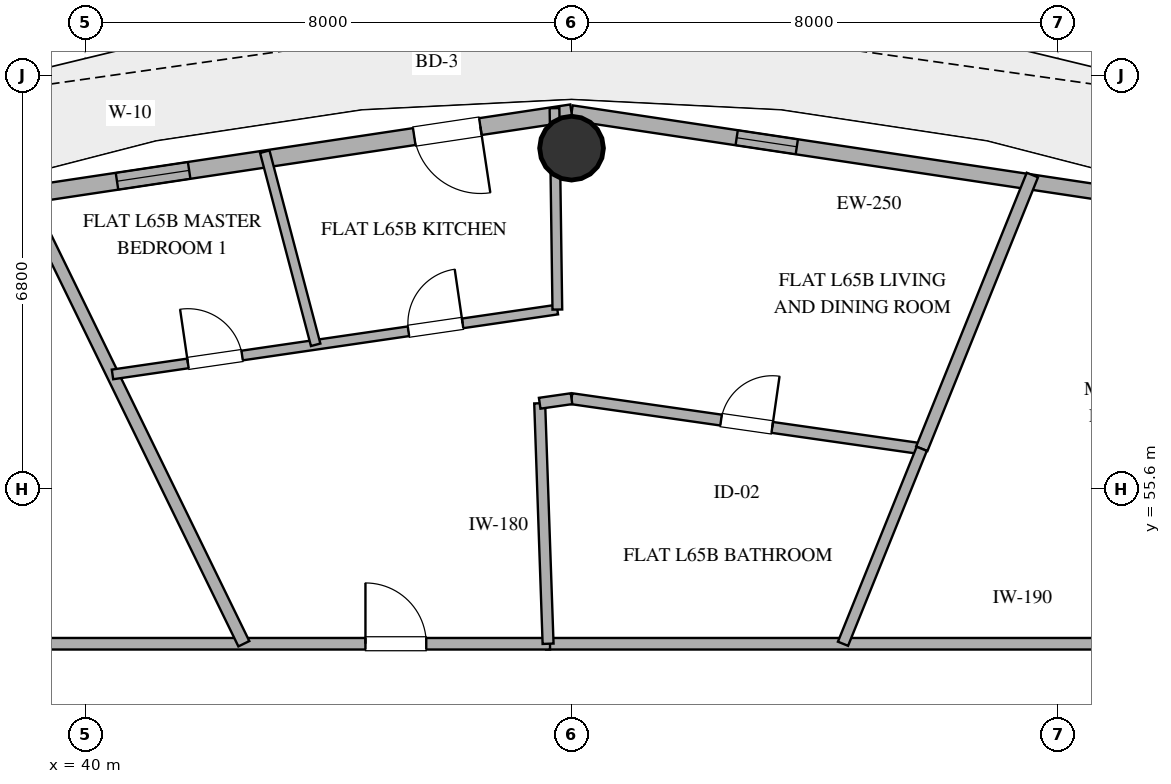
"""IFC4 building model, lengths in metres.
Left out: names, types, materials, properties, quantities, classifications, styles, units other than length and angle.
Written with IfcOpenShell. Run it as: python <this file> out.ifc"""

import sys

from ifc_helpers import new_model, si_unit, direction, frame, frame_2d, origin, origin_2d, place, context, subcontext, project, spatial, rectangle, hollow_circle, extrude, element, fill, save


model = new_model("IFC4")
c1 = context("Model", 3, precision=1e-05, world=origin(), true_north=direction((0.0, 1.0)))
c2 = subcontext(c1, "Body", "Model", "MODEL_VIEW")
j1 = project(units=[si_unit("LENGTHUNIT", "METRE"), si_unit("PLANEANGLEUNIT", "RADIAN")], contexts=[c1])
p1 = place(None, origin())
s1 = spatial("IfcSite", under=j1, at=p1, CompositionType="ELEMENT")
p2 = place(p1, origin())
s2 = spatial("IfcBuilding", under=s1, at=p2, CompositionType="ELEMENT")
p3 = place(p2, frame((0.0, 0.0, 253.2)))
s3 = spatial("IfcBuildingStorey", under=s2, at=p3, CompositionType="ELEMENT", Elevation=253.2)
p4 = place(p3, frame((48.0, 61.2, 0.0), z_axis=(0.0, 0.0, 1.0), x_axis=(1.0, 0.0, 0.0)))
e1 = element("IfcColumn", 1, at=p4, inside=s3, PredefinedType="COLUMN", context=c2, shape_type="SweptSolid", body=[
    extrude(hollow_circle(Radius=0.525, WallThickness=0.028, at=origin_2d()), origin(), (0.0, 0.0, 1.0), 3.25),
])
p5 = place(p3, frame((58.013, 60.274, 0.0), z_axis=(0.0, 0.0, 1.0), x_axis=(-0.988882522213, 0.148698881169, 0.0)))
e2 = element("IfcWall", 2, at=p5, inside=s3, PredefinedType="SOLIDWALL", context=c2, shape_type="SweptSolid", body=[
    extrude(rectangle(XDim=10.125, YDim=0.25, at=frame_2d((5.062, 0.0))), origin(), (0.0, 0.0, 1.0), 3.25),
])
p6 = place(p5, frame((6.379, 0.0, 1.42)))
e3 = element("IfcOpeningElement", 3, at=p6, cuts=e2, PredefinedType="OPENING", context=c2, shape_type="SweptSolid", body=[
    extrude(rectangle(XDim=1.0, YDim=1.05, at=frame_2d((0.5, 0.525))), frame((0.0, 0.135, 0.0), z_axis=(0.0, -1.0, 0.0), x_axis=(1.0, 0.0, 0.0)), (0.0, 0.0, 1.0), 0.27),
])
p7 = place(p3, frame((48.0, 61.78, 0.0), z_axis=(0.0, 0.0, 1.0), x_axis=(-0.988882522213, -0.148698881169, 0.0)))
e4 = element("IfcWall", 4, at=p7, inside=s3, PredefinedType="SOLIDWALL", context=c2, shape_type="SweptSolid", body=[
    extrude(rectangle(XDim=10.125, YDim=0.28, at=frame_2d((5.062, 0.0))), origin(), (0.0, 0.0, 1.0), 3.25),
])
p8 = place(p7, frame((1.516, 0.0, 0.0)))
e5 = element("IfcOpeningElement", 5, at=p8, cuts=e4, PredefinedType="OPENING", context=c2, shape_type="SweptSolid", body=[
    extrude(rectangle(XDim=1.1, YDim=2.25, at=frame_2d((0.55, 1.125))), frame((0.0, 0.15, 0.0), z_axis=(0.0, -1.0, 0.0), x_axis=(1.0, 0.0, 0.0)), (0.0, 0.0, 1.0), 0.3),
])
p9 = place(p7, frame((6.36, 0.0, 0.85)))
e6 = element("IfcOpeningElement", 6, at=p9, cuts=e4, PredefinedType="OPENING", context=c2, shape_type="SweptSolid", body=[
    extrude(rectangle(XDim=1.2, YDim=1.6, at=frame_2d((0.6, 0.8))), frame((0.0, 0.15, 0.0), z_axis=(0.0, -1.0, 0.0), x_axis=(1.0, 0.0, 0.0)), (0.0, 0.0, 1.0), 0.3),
])
p10 = place(p3, frame((47.582, 53.05, 0.0), z_axis=(0.0, 0.0, 1.0), x_axis=(1.0, 0.0, 0.0)))
e7 = element("IfcWall", 7, at=p10, inside=s3, PredefinedType="PARTITIONING", context=c2, shape_type="SweptSolid", body=[
    extrude(rectangle(XDim=15.668, YDim=0.19, at=frame_2d((7.834, 0.0))), origin(), (0.0, 0.0, 1.0), 2.61),
])
p11 = place(p10, frame((9.758, 0.0, 0.0)))
e8 = element("IfcOpeningElement", 8, at=p11, cuts=e7, PredefinedType="OPENING", context=c2, shape_type="SweptSolid", body=[
    extrude(rectangle(XDim=1.0, YDim=2.2, at=frame_2d((0.5, 1.1))), frame((0.0, 0.105, 0.0), z_axis=(0.0, -1.0, 0.0), x_axis=(1.0, 0.0, 0.0)), (0.0, 0.0, 1.0), 0.21),
])
p12 = place(p3, frame((32.75, 53.05, 0.0), z_axis=(0.0, 0.0, 1.0), x_axis=(1.0, 0.0, 0.0)))
e9 = element("IfcWall", 9, at=p12, inside=s3, PredefinedType="PARTITIONING", context=c2, shape_type="SweptSolid", body=[
    extrude(rectangle(XDim=14.896, YDim=0.19, at=frame_2d((7.448, 0.0))), origin(), (0.0, 0.0, 1.0), 2.61),
])
p13 = place(p12, frame((4.448, 0.0, 0.0)))
e10 = element("IfcOpeningElement", 10, at=p13, cuts=e9, PredefinedType="OPENING", context=c2, shape_type="SweptSolid", body=[
    extrude(rectangle(XDim=1.0, YDim=2.2, at=frame_2d((0.5, 1.1))), frame((0.0, 0.105, 0.0), z_axis=(0.0, -1.0, 0.0), x_axis=(1.0, 0.0, 0.0)), (0.0, 0.0, 1.0), 0.21),
])
p14 = place(p12, frame((11.861, 0.0, 0.0)))
e11 = element("IfcOpeningElement", 11, at=p14, cuts=e9, PredefinedType="OPENING", context=c2, shape_type="SweptSolid", body=[
    extrude(rectangle(XDim=1.0, YDim=2.2, at=frame_2d((0.5, 1.1))), frame((0.0, 0.105, 0.0), z_axis=(0.0, -1.0, 0.0), x_axis=(1.0, 0.0, 0.0)), (0.0, 0.0, 1.0), 0.21),
])
p15 = place(p3, frame((48.0, 57.08, 0.0), z_axis=(0.0, 0.0, 1.0), x_axis=(0.98992178104, -0.141615209012, 0.0)))
e12 = element("IfcWall", 12, at=p15, inside=s3, PredefinedType="PLUMBINGWALL", context=c2, shape_type="SweptSolid", body=[
    extrude(rectangle(XDim=5.818, YDim=0.18, at=frame_2d((2.909, 0.0))), origin(), (0.0, 0.0, 1.0), 2.61),
])
p16 = place(p15, frame((2.484, 0.0, 0.0)))
e13 = element("IfcOpeningElement", 13, at=p16, cuts=e12, PredefinedType="OPENING", context=c2, shape_type="SweptSolid", body=[
    extrude(rectangle(XDim=0.85, YDim=2.1, at=frame_2d((0.425, 1.05))), frame((0.0, 0.1, 0.0), z_axis=(0.0, -1.0, 0.0), x_axis=(1.0, 0.0, 0.0)), (0.0, 0.0, 1.0), 0.2),
])
p17 = place(p3, frame((42.611, 53.05, 0.0), z_axis=(0.0, 0.0, 1.0), x_axis=(-0.438386671508, 0.898786474222, 0.0)))
e14 = element("IfcWall", 14, at=p17, inside=s3, PredefinedType="PARTITIONING", context=c2, shape_type="SweptSolid", body=[
    extrude(rectangle(XDim=8.329, YDim=0.2, at=frame_2d((4.165, 0.0))), origin(), (0.0, 0.0, 1.0), 2.61),
])
p18 = place(p3, frame((55.579, 60.758, 0.0), z_axis=(0.0, 0.0, 1.0), x_axis=(-0.374621823663, -0.927177701002, 0.0)))
e15 = element("IfcWall", 15, at=p18, inside=s3, PredefinedType="PARTITIONING", context=c2, shape_type="SweptSolid", body=[
    extrude(rectangle(XDim=4.856, YDim=0.2, at=frame_2d((2.428, 0.0))), origin(), (0.0, 0.0, 1.0), 2.61),
])
p19 = place(p3, frame((40.45, 57.479, 0.0), z_axis=(0.0, 0.0, 1.0), x_axis=(0.989534552703, 0.144296115701, 0.0)))
e16 = element("IfcWall", 16, at=p19, inside=s3, PredefinedType="PLUMBINGWALL", context=c2, shape_type="SweptSolid", body=[
    extrude(rectangle(XDim=7.394, YDim=0.16, at=frame_2d((3.697, 0.0))), origin(), (0.0, 0.0, 1.0), 2.61),
])
p20 = place(p19, frame((4.919, 0.0, 0.0)))
e17 = element("IfcOpeningElement", 17, at=p20, cuts=e16, PredefinedType="OPENING", context=c2, shape_type="SweptSolid", body=[
    extrude(rectangle(XDim=0.9, YDim=2.1, at=frame_2d((0.45, 1.05))), frame((0.0, 0.09, 0.0), z_axis=(0.0, -1.0, 0.0), x_axis=(1.0, 0.0, 0.0)), (0.0, 0.0, 1.0), 0.18),
])
p21 = place(p19, frame((1.254, 0.0, 0.0)))
e18 = element("IfcOpeningElement", 18, at=p21, cuts=e16, PredefinedType="OPENING", context=c2, shape_type="SweptSolid", body=[
    extrude(rectangle(XDim=0.9, YDim=2.1, at=frame_2d((0.45, 1.05))), frame((0.0, 0.09, 0.0), z_axis=(0.0, -1.0, 0.0), x_axis=(1.0, 0.0, 0.0)), (0.0, 0.0, 1.0), 0.18),
])
p22 = place(p3, frame((47.614, 53.05, 0.0), z_axis=(0.0, 0.0, 1.0), x_axis=(-0.034857500177, 0.999392292687, 0.0)))
e19 = element("IfcWall", 19, at=p22, inside=s3, PredefinedType="PLUMBINGWALL", context=c2, shape_type="SweptSolid", body=[
    extrude(rectangle(XDim=3.957, YDim=0.18, at=frame_2d((1.979, 0.0))), origin(), (0.0, 0.0, 1.0), 2.61),
])
p23 = place(p3, frame((53.76, 56.256, 0.0), z_axis=(0.0, 0.0, 1.0), x_axis=(-0.374565779855, -0.927200343271, 0.0)))
e20 = element("IfcWall", 20, at=p23, inside=s3, PredefinedType="PLUMBINGWALL", context=c2, shape_type="SweptSolid", body=[
    extrude(rectangle(XDim=3.458, YDim=0.18, at=frame_2d((1.729, 0.0))), origin(), (0.0, 0.0, 1.0), 2.61),
])
p24 = place(p3, frame((47.767, 58.546, 0.0), z_axis=(0.0, 0.0, 1.0), x_axis=(-0.01415056948, 0.999899875679, 0.0)))
e21 = element("IfcWall", 21, at=p24, inside=s3, PredefinedType="PLUMBINGWALL", context=c2, shape_type="SweptSolid", body=[
    extrude(rectangle(XDim=3.312, YDim=0.16, at=frame_2d((1.656, 0.0))), origin(), (0.0, 0.0, 1.0), 2.61),
])
p25 = place(p3, frame((42.955, 61.142, 0.0), z_axis=(0.0, 0.0, 1.0), x_axis=(0.254917754424, -0.96696273893, 0.0)))
e22 = element("IfcWall", 22, at=p25, inside=s3, PredefinedType="PLUMBINGWALL", context=c2, shape_type="SweptSolid", body=[
    extrude(rectangle(XDim=3.284, YDim=0.16, at=frame_2d((1.642, 0.0))), origin(), (0.0, 0.0, 1.0), 2.61),
])
p26 = place(p3, frame((47.476, 57.005, 0.0), z_axis=(0.0, 0.0, 1.0), x_axis=(0.989857031687, 0.142067085629, 0.0)))
e23 = element("IfcWall", 23, at=p26, inside=s3, PredefinedType="PLUMBINGWALL", context=c2, shape_type="SweptSolid", body=[
    extrude(rectangle(XDim=0.529, YDim=0.18, at=frame_2d((0.265, 0.0))), origin(), (0.0, 0.0, 1.0), 2.61),
])
p27 = place(p8, origin())
e24 = element("IfcDoor", 24, at=p27, inside=s3, OperationType="SINGLE_SWING_LEFT", PredefinedType="DOOR", context=c2, shape_type="SweptSolid", body=[
    extrude(rectangle(XDim=1.1, YDim=2.25, at=frame_2d((0.55, 1.125))), frame((0.0, 0.025, 0.0), z_axis=(0.0, -1.0, 0.0), x_axis=(1.0, 0.0, 0.0)), (0.0, 0.0, 1.0), 0.05),
])
fill(e5, e24)
p28 = place(p9, origin())
e25 = element("IfcWindow", 25, at=p28, inside=s3, PartitioningType="SINGLE_PANEL", PredefinedType="WINDOW", context=c2, shape_type="SweptSolid", body=[
    extrude(rectangle(XDim=1.2, YDim=1.6, at=frame_2d((0.6, 0.8))), frame((0.0, 0.03, 0.0), z_axis=(0.0, -1.0, 0.0), x_axis=(1.0, 0.0, 0.0)), (0.0, 0.0, 1.0), 0.06),
])
fill(e6, e25)
p29 = place(p6, origin())
e26 = element("IfcWindow", 26, at=p29, inside=s3, PartitioningType="SINGLE_PANEL", PredefinedType="WINDOW", context=c2, shape_type="SweptSolid", body=[
    extrude(rectangle(XDim=1.0, YDim=1.05, at=frame_2d((0.5, 0.525))), frame((0.0, 0.03, 0.0), z_axis=(0.0, -1.0, 0.0), x_axis=(1.0, 0.0, 0.0)), (0.0, 0.0, 1.0), 0.06),
])
fill(e3, e26)
p30 = place(p14, origin())
e27 = element("IfcDoor", 27, at=p30, inside=s3, OperationType="SINGLE_SWING_LEFT", PredefinedType="DOOR", context=c2, shape_type="SweptSolid", body=[
    extrude(rectangle(XDim=1.0, YDim=2.2, at=frame_2d((0.5, 1.1))), frame((0.0, 0.025, 0.0), z_axis=(0.0, -1.0, 0.0), x_axis=(1.0, 0.0, 0.0)), (0.0, 0.0, 1.0), 0.05),
])
fill(e11, e27)
p31 = place(p16, origin())
e28 = element("IfcDoor", 28, at=p31, inside=s3, OperationType="SINGLE_SWING_RIGHT", PredefinedType="DOOR", context=c2, shape_type="SweptSolid", body=[
    extrude(rectangle(XDim=0.85, YDim=2.1, at=frame_2d((0.425, 1.05))), frame((0.0, 0.025, 0.0), z_axis=(0.0, -1.0, 0.0), x_axis=(1.0, 0.0, 0.0)), (0.0, 0.0, 1.0), 0.05),
])
fill(e13, e28)
p32 = place(p20, origin())
e29 = element("IfcDoor", 29, at=p32, inside=s3, OperationType="SINGLE_SWING_RIGHT", PredefinedType="DOOR", context=c2, shape_type="SweptSolid", body=[
    extrude(rectangle(XDim=0.9, YDim=2.1, at=frame_2d((0.45, 1.05))), frame((0.0, 0.025, 0.0), z_axis=(0.0, -1.0, 0.0), x_axis=(1.0, 0.0, 0.0)), (0.0, 0.0, 1.0), 0.05),
])
fill(e17, e29)
p33 = place(p21, origin())
e30 = element("IfcDoor", 30, at=p33, inside=s3, OperationType="SINGLE_SWING_LEFT", PredefinedType="DOOR", context=c2, shape_type="SweptSolid", body=[
    extrude(rectangle(XDim=0.9, YDim=2.1, at=frame_2d((0.45, 1.05))), frame((0.0, 0.025, 0.0), z_axis=(0.0, -1.0, 0.0), x_axis=(1.0, 0.0, 0.0)), (0.0, 0.0, 1.0), 0.05),
])
fill(e18, e30)
save(model, sys.argv[1])
